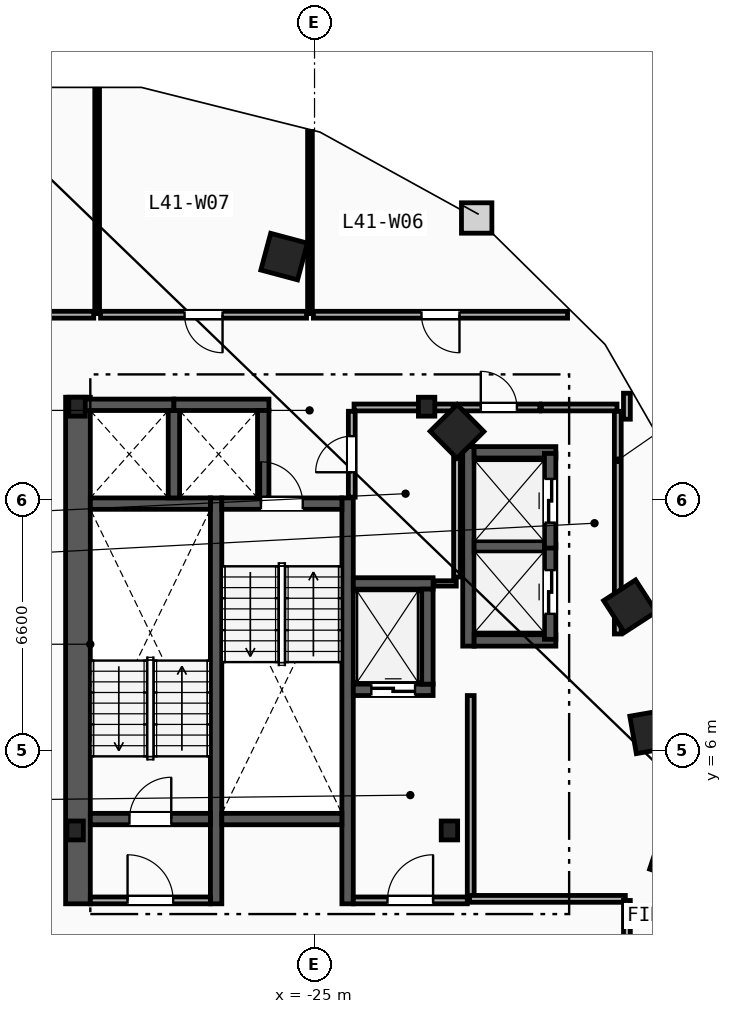
"""IFC4 building model, lengths in metres.
Left out: names, types, materials, properties, quantities, classifications, styles, units other than length and angle.
Written with IfcOpenShell. Run it as: python <this file> out.ifc"""

import sys

from ifc_helpers import new_model, si_unit, direction, frame, frame_2d, origin, origin_2d, place, context, subcontext, project, spatial, rectangle, i_section, extrude, element, fill, save


model = new_model("IFC4")
c1 = context("Model", 3, precision=1e-05, world=origin(), true_north=direction((0.0, 1.0)))
c2 = subcontext(c1, "Body", "Model", "MODEL_VIEW")
j1 = project(units=[si_unit("LENGTHUNIT", "METRE"), si_unit("PLANEANGLEUNIT", "RADIAN")], contexts=[c1])
p1 = place(None, origin())
s1 = spatial("IfcSite", under=j1, at=p1, CompositionType="ELEMENT")
p2 = place(p1, origin())
s2 = spatial("IfcBuilding", under=s1, at=p2, CompositionType="ELEMENT")
p3 = place(p2, frame((0.0, 0.0, 158.4)))
s3 = spatial("IfcBuildingStorey", under=s2, at=p3, CompositionType="ELEMENT", Elevation=158.4)
for number, where, z_axis, x_axis in (
    (1, (-31.3, 3.9, 0.0), (0.0, 0.0, 1.0), (1.0, 0.0, 0.0)),
    (2, (-21.45, 3.9, 0.0), (0.0, 0.0, 1.0), (1.0, 0.0, 0.0)),
    (3, (-22.05, 15.05, 0.0), (0.0, 0.0, 1.0), (1.0, 0.0, 0.0)),
    (4, (-31.25, 15.05, 0.0), (0.0, 0.0, 1.0), (1.0, 0.0, 0.0)),
):
    element("IfcColumn", number, at=place(p3, frame(where, z_axis=z_axis, x_axis=x_axis)), inside=s3, PredefinedType="COLUMN", context=c2, shape_type="SweptSolid", body=[
        extrude(i_section(OverallWidth=0.432, OverallDepth=0.498, WebThickness=0.056, FlangeThickness=0.089, FilletRadius=0.018, at=origin_2d()), origin(), (0.0, 0.0, 1.0), 3.6),
    ])
for number, where, z_axis, x_axis in (
    (5, (-15.55, 3.2, 0.0), (0.0, 0.0, 1.0), (0.315, 0.949, 0.0)),
    (6, (-16.125, 6.5, 0.0), (0.0, 0.0, 1.0), (-0.172, 0.985, 0.0)),
    (7, (-16.7, 9.8, 0.0), (0.0, 0.0, 1.0), (-0.544, 0.839, 0.0)),
    (8, (-21.25, 14.4, 0.0), (0.0, 0.0, 1.0), (-0.703, 0.711, 0.0)),
    (9, (-25.8, 19.0, 0.0), (0.0, 0.0, 1.0), (-0.966, 0.259, 0.0)),
):
    element("IfcColumn", number, at=place(p3, frame(where, z_axis=z_axis, x_axis=x_axis)), inside=s3, PredefinedType="COLUMN", context=c2, shape_type="SweptSolid", body=[
        extrude(rectangle(XDim=1.0, YDim=1.0, at=origin_2d()), origin(), (0.0, 0.0, 1.0), 3.6),
    ])
p4 = place(p3, frame((-31.225, 1.97, 0.0), z_axis=(0.0, 0.0, 1.0), x_axis=(0.0, 1.0, 0.0)))
e10 = element("IfcWall", 10, at=p4, inside=s3, PredefinedType="SHEAR", context=c2, shape_type="SweptSolid", body=[
    extrude(rectangle(XDim=13.33, YDim=0.65, at=frame_2d((6.665, 0.0))), origin(), (0.0, 0.0, 1.0), 3.36),
])
for number, where, z_axis, x_axis in (
    (11, (-27.59, 1.97, 0.0), (0.0, 0.0, 1.0), (0.0, 1.0, 0.0)),
    (12, (-24.13, 1.97, 0.0), (0.0, 0.0, 1.0), (0.0, 1.0, 0.0)),
):
    element("IfcWall", number, at=place(p3, frame(where, z_axis=z_axis, x_axis=x_axis)), inside=s3, PredefinedType="SHEAR", context=c2, shape_type="SweptSolid", body=[
        extrude(rectangle(XDim=10.68, YDim=0.3, at=frame_2d((5.34, 0.0))), origin(), (0.0, 0.0, 1.0), 3.36),
    ])
p5 = place(p3, frame((-30.9, 4.2, 0.0), z_axis=(0.0, 0.0, 1.0), x_axis=(1.0, 0.0, 0.0)))
e13 = element("IfcWall", 13, at=p5, inside=s3, PredefinedType="SHEAR", context=c2, shape_type="SweptSolid", body=[
    extrude(rectangle(XDim=3.16, YDim=0.3, at=frame_2d((1.58, 0.0))), origin(), (0.0, 0.0, 1.0), 3.36),
])
p6 = place(p5, frame((1.03, 0.0, 0.0)))
e14 = element("IfcOpeningElement", 14, at=p6, cuts=e13, PredefinedType="OPENING", context=c2, shape_type="SweptSolid", body=[
    extrude(rectangle(XDim=1.1, YDim=2.15, at=frame_2d((0.55, 1.075))), frame((0.0, 0.16, 0.0), z_axis=(0.0, -1.0, 0.0), x_axis=(1.0, 0.0, 0.0)), (0.0, 0.0, 1.0), 0.32),
])
p7 = place(p3, frame((-30.9, 12.5, 0.0), z_axis=(0.0, 0.0, 1.0), x_axis=(1.0, 0.0, 0.0)))
e15 = element("IfcWall", 15, at=p7, inside=s3, PredefinedType="SHEAR", context=c2, shape_type="SweptSolid", body=[
    extrude(rectangle(XDim=3.16, YDim=0.3, at=frame_2d((1.58, 0.0))), origin(), (0.0, 0.0, 1.0), 3.36),
])
p8 = place(p3, frame((-27.44, 12.5, 0.0), z_axis=(0.0, 0.0, 1.0), x_axis=(1.0, 0.0, 0.0)))
e16 = element("IfcWall", 16, at=p8, inside=s3, PredefinedType="SHEAR", context=c2, shape_type="SweptSolid", body=[
    extrude(rectangle(XDim=3.16, YDim=0.3, at=frame_2d((1.58, 0.0))), origin(), (0.0, 0.0, 1.0), 3.36),
])
p9 = place(p8, frame((1.03, 0.0, 0.0)))
e17 = element("IfcOpeningElement", 17, at=p9, cuts=e16, PredefinedType="OPENING", context=c2, shape_type="SweptSolid", body=[
    extrude(rectangle(XDim=1.1, YDim=2.15, at=frame_2d((0.55, 1.075))), frame((0.0, 0.16, 0.0), z_axis=(0.0, -1.0, 0.0), x_axis=(1.0, 0.0, 0.0)), (0.0, 0.0, 1.0), 0.32),
])
p10 = place(p3, frame((-27.44, 4.2, 0.0), z_axis=(0.0, 0.0, 1.0), x_axis=(1.0, 0.0, 0.0)))
e18 = element("IfcWall", 18, at=p10, inside=s3, PredefinedType="SHEAR", context=c2, shape_type="SweptSolid", body=[
    extrude(rectangle(XDim=3.16, YDim=0.3, at=frame_2d((1.58, 0.0))), origin(), (0.0, 0.0, 1.0), 3.36),
])
p11 = place(p3, frame((-20.89, 2.15, 0.0), z_axis=(0.0, 0.0, 1.0), x_axis=(0.0, 1.0, 0.0)))
e19 = element("IfcWall", 19, at=p11, inside=s3, PredefinedType="PARTITIONING", context=c2, shape_type="SweptSolid", body=[
    extrude(rectangle(XDim=5.3, YDim=0.18, at=frame_2d((2.65, 0.0))), origin(), (0.0, 0.0, 1.0), 3.36),
])
p12 = place(p3, frame((-23.98, 2.06, 0.0), z_axis=(0.0, 0.0, 1.0), x_axis=(1.0, 0.0, 0.0)))
e20 = element("IfcWall", 20, at=p12, inside=s3, PredefinedType="PARTITIONING", context=c2, shape_type="SweptSolid", body=[
    extrude(rectangle(XDim=3.0, YDim=0.18, at=frame_2d((1.5, 0.0))), origin(), (0.0, 0.0, 1.0), 3.36),
])
p13 = place(p12, frame((0.9, 0.0, 0.0)))
e21 = element("IfcOpeningElement", 21, at=p13, cuts=e20, PredefinedType="OPENING", context=c2, shape_type="SweptSolid", body=[
    extrude(rectangle(XDim=1.2, YDim=2.15, at=frame_2d((0.6, 1.075))), frame((0.0, 0.1, 0.0), z_axis=(0.0, -1.0, 0.0), x_axis=(1.0, 0.0, 0.0)), (0.0, 0.0, 1.0), 0.2),
])
p14 = place(p3, frame((-30.9, 2.06, 0.0), z_axis=(0.0, 0.0, 1.0), x_axis=(1.0, 0.0, 0.0)))
e22 = element("IfcWall", 22, at=p14, inside=s3, PredefinedType="PARTITIONING", context=c2, shape_type="SweptSolid", body=[
    extrude(rectangle(XDim=3.16, YDim=0.18, at=frame_2d((1.58, 0.0))), origin(), (0.0, 0.0, 1.0), 3.36),
])
p15 = place(p14, frame((0.98, 0.0, 0.0)))
e23 = element("IfcOpeningElement", 23, at=p15, cuts=e22, PredefinedType="OPENING", context=c2, shape_type="SweptSolid", body=[
    extrude(rectangle(XDim=1.2, YDim=2.15, at=frame_2d((0.6, 1.075))), frame((0.0, 0.1, 0.0), z_axis=(0.0, -1.0, 0.0), x_axis=(1.0, 0.0, 0.0)), (0.0, 0.0, 1.0), 0.2),
])
p16 = place(p3, frame((-23.98, 7.6, 0.0), z_axis=(0.0, 0.0, 1.0), x_axis=(1.0, 0.0, 0.0)))
e24 = element("IfcWall", 24, at=p16, inside=s3, PredefinedType="SHEAR", context=c2, shape_type="SweptSolid", body=[
    extrude(rectangle(XDim=2.1, YDim=0.3, at=frame_2d((1.05, 0.0))), origin(), (0.0, 0.0, 1.0), 3.36),
])
p17 = place(p16, frame((0.475, 0.0, 0.0)))
e25 = element("IfcOpeningElement", 25, at=p17, cuts=e24, PredefinedType="OPENING", context=c2, shape_type="SweptSolid", body=[
    extrude(rectangle(XDim=1.15, YDim=2.2, at=frame_2d((0.575, 1.1))), frame((0.0, 0.16, 0.0), z_axis=(0.0, -1.0, 0.0), x_axis=(1.0, 0.0, 0.0)), (0.0, 0.0, 1.0), 0.32),
])
p18 = place(p3, frame((-23.98, 10.4, 0.0), z_axis=(0.0, 0.0, 1.0), x_axis=(1.0, 0.0, 0.0)))
e26 = element("IfcWall", 26, at=p18, inside=s3, PredefinedType="SHEAR", context=c2, shape_type="SweptSolid", body=[
    extrude(rectangle(XDim=2.1, YDim=0.3, at=frame_2d((1.05, 0.0))), origin(), (0.0, 0.0, 1.0), 3.36),
])
for number, where, z_axis, x_axis in (
    (27, (-22.03, 7.75, 0.0), (0.0, 0.0, 1.0), (0.0, 1.0, 0.0)),
    (28, (-31.2, 15.1, 0.0), (0.0, 0.0, 1.0), (1.0, 0.0, 0.0)),
):
    element("IfcWall", number, at=place(p3, frame(where, z_axis=z_axis, x_axis=x_axis)), inside=s3, PredefinedType="SHEAR", context=c2, shape_type="SweptSolid", body=[
        extrude(rectangle(XDim=2.5, YDim=0.3, at=frame_2d((1.25, 0.0))), origin(), (0.0, 0.0, 1.0), 3.36),
    ])
p19 = place(p3, frame((-28.7, 12.65, 0.0), z_axis=(0.0, 0.0, 1.0), x_axis=(0.0, 1.0, 0.0)))
e29 = element("IfcWall", 29, at=p19, inside=s3, PredefinedType="SHEAR", context=c2, shape_type="SweptSolid", body=[
    extrude(rectangle(XDim=2.3, YDim=0.3, at=frame_2d((1.15, 0.0))), origin(), (0.0, 0.0, 1.0), 3.36),
])
p20 = place(p3, frame((-28.7, 15.1, 0.0), z_axis=(0.0, 0.0, 1.0), x_axis=(1.0, 0.0, 0.0)))
e30 = element("IfcWall", 30, at=p20, inside=s3, PredefinedType="SHEAR", context=c2, shape_type="SweptSolid", body=[
    extrude(rectangle(XDim=2.5, YDim=0.3, at=frame_2d((1.25, 0.0))), origin(), (0.0, 0.0, 1.0), 3.36),
])
p21 = place(p3, frame((-26.35, 12.65, 0.0), z_axis=(0.0, 0.0, 1.0), x_axis=(0.0, 1.0, 0.0)))
e31 = element("IfcWall", 31, at=p21, inside=s3, PredefinedType="SHEAR", context=c2, shape_type="SweptSolid", body=[
    extrude(rectangle(XDim=2.3, YDim=0.3, at=frame_2d((1.15, 0.0))), origin(), (0.0, 0.0, 1.0), 3.36),
])
p22 = place(p3, frame((-20.95, 8.75, 0.0), z_axis=(0.0, 0.0, 1.0), x_axis=(0.0, 1.0, 0.0)))
e32 = element("IfcWall", 32, at=p22, inside=s3, PredefinedType="SHEAR", context=c2, shape_type="SweptSolid", body=[
    extrude(rectangle(XDim=5.25, YDim=0.3, at=frame_2d((2.625, 0.0))), origin(), (0.0, 0.0, 1.0), 3.36),
])
for number, where, z_axis, x_axis in (
    (33, (-20.8, 8.9, 0.0), (0.0, 0.0, 1.0), (1.0, 0.0, 0.0)),
    (34, (-20.8, 13.85, 0.0), (0.0, 0.0, 1.0), (1.0, 0.0, 0.0)),
):
    element("IfcWall", number, at=place(p3, frame(where, z_axis=z_axis, x_axis=x_axis)), inside=s3, PredefinedType="SHEAR", context=c2, shape_type="SweptSolid", body=[
        extrude(rectangle(XDim=2.15, YDim=0.3, at=frame_2d((1.075, 0.0))), origin(), (0.0, 0.0, 1.0), 3.36),
    ])
p23 = place(p3, frame((-20.8, 11.375, 0.0), z_axis=(0.0, 0.0, 1.0), x_axis=(1.0, 0.0, 0.0)))
e35 = element("IfcWall", 35, at=p23, inside=s3, PredefinedType="SHEAR", context=c2, shape_type="SweptSolid", body=[
    extrude(rectangle(XDim=1.85, YDim=0.3, at=frame_2d((0.925, 0.0))), origin(), (0.0, 0.0, 1.0), 3.36),
])
p24 = place(p3, frame((-18.8, 8.93, 0.0), z_axis=(0.0, 0.0, 1.0), x_axis=(0.0, 1.0, 0.0)))
e36 = element("IfcWall", 36, at=p24, inside=s3, PredefinedType="SHEAR", context=c2, shape_type="SweptSolid", body=[
    extrude(rectangle(XDim=2.49, YDim=0.3, at=frame_2d((1.245, 0.0))), origin(), (0.0, 0.0, 1.0), 3.36),
])
p25 = place(p24, frame((0.67, 0.0, 0.0)))
e37 = element("IfcOpeningElement", 37, at=p25, cuts=e36, PredefinedType="OPENING", context=c2, shape_type="SweptSolid", body=[
    extrude(rectangle(XDim=1.15, YDim=2.2, at=frame_2d((0.575, 1.1))), frame((0.0, 0.16, 0.0), z_axis=(0.0, -1.0, 0.0), x_axis=(1.0, 0.0, 0.0)), (0.0, 0.0, 1.0), 0.32),
])
p26 = place(p3, frame((-18.8, 11.33, 0.0), z_axis=(0.0, 0.0, 1.0), x_axis=(0.0, 1.0, 0.0)))
e38 = element("IfcWall", 38, at=p26, inside=s3, PredefinedType="SHEAR", context=c2, shape_type="SweptSolid", body=[
    extrude(rectangle(XDim=2.49, YDim=0.3, at=frame_2d((1.245, 0.0))), origin(), (0.0, 0.0, 1.0), 3.36),
])
p27 = place(p26, frame((0.67, 0.0, 0.0)))
e39 = element("IfcOpeningElement", 39, at=p27, cuts=e38, PredefinedType="OPENING", context=c2, shape_type="SweptSolid", body=[
    extrude(rectangle(XDim=1.15, YDim=2.2, at=frame_2d((0.575, 1.1))), frame((0.0, 0.16, 0.0), z_axis=(0.0, -1.0, 0.0), x_axis=(1.0, 0.0, 0.0)), (0.0, 0.0, 1.0), 0.32),
])
p28 = place(p3, frame((-17.02, 9.07, 0.0), z_axis=(0.0, 0.0, 1.0), x_axis=(0.0, 1.0, 0.0)))
e40 = element("IfcWall", 40, at=p28, inside=s3, PredefinedType="PARTITIONING", context=c2, shape_type="SweptSolid", body=[
    extrude(rectangle(XDim=5.86, YDim=0.18, at=frame_2d((2.93, 0.0))), origin(), (0.0, 0.0, 1.0), 3.36),
])
p29 = place(p3, frame((-21.23, 15.03, 0.0), z_axis=(0.0, 0.0, 1.0), x_axis=(1.0, 0.0, 0.0)))
e41 = element("IfcWall", 41, at=p29, inside=s3, PredefinedType="PARTITIONING", context=c2, shape_type="SweptSolid", body=[
    extrude(rectangle(XDim=2.16, YDim=0.18, at=frame_2d((1.08, 0.0))), origin(), (0.0, 0.0, 1.0), 3.36),
])
p30 = place(p29, frame((0.605, 0.0, 0.0)))
e42 = element("IfcOpeningElement", 42, at=p30, cuts=e41, PredefinedType="OPENING", context=c2, shape_type="SweptSolid", body=[
    extrude(rectangle(XDim=0.95, YDim=2.1, at=frame_2d((0.475, 1.05))), frame((0.0, 0.1, 0.0), z_axis=(0.0, -1.0, 0.0), x_axis=(1.0, 0.0, 0.0)), (0.0, 0.0, 1.0), 0.2),
])
p31 = place(p3, frame((-19.03, 15.03, 0.0), z_axis=(0.0, 0.0, 1.0), x_axis=(1.0, 0.0, 0.0)))
e43 = element("IfcWall", 43, at=p31, inside=s3, PredefinedType="PARTITIONING", context=c2, shape_type="SweptSolid", body=[
    extrude(rectangle(XDim=1.99, YDim=0.18, at=frame_2d((0.995, 0.0))), origin(), (0.0, 0.0, 1.0), 3.36),
])
p32 = place(p3, frame((-21.86, 10.4, 0.0), z_axis=(0.0, 0.0, 1.0), x_axis=(1.0, 0.0, 0.0)))
e44 = element("IfcWall", 44, at=p32, inside=s3, PredefinedType="PARTITIONING", context=c2, shape_type="SweptSolid", body=[
    extrude(rectangle(XDim=0.59, YDim=0.14, at=frame_2d((0.295, 0.0))), origin(), (0.0, 0.0, 1.0), 3.36),
])
p33 = place(p3, frame((-21.25, 10.57, 0.0), z_axis=(0.0, 0.0, 1.0), x_axis=(0.0, 1.0, 0.0)))
e45 = element("IfcWall", 45, at=p33, inside=s3, PredefinedType="PARTITIONING", context=c2, shape_type="SweptSolid", body=[
    extrude(rectangle(XDim=4.36, YDim=0.18, at=frame_2d((2.18, 0.0))), origin(), (0.0, 0.0, 1.0), 3.36),
])
p34 = place(p3, frame((-23.96, 15.03, 0.0), z_axis=(0.0, 0.0, 1.0), x_axis=(1.0, 0.0, 0.0)))
e46 = element("IfcWall", 46, at=p34, inside=s3, PredefinedType="PARTITIONING", context=c2, shape_type="SweptSolid", body=[
    extrude(rectangle(XDim=2.61, YDim=0.18, at=frame_2d((1.305, 0.0))), origin(), (0.0, 0.0, 1.0), 2.433),
])
p35 = place(p3, frame((-24.02, 12.67, 0.0), z_axis=(0.0, 0.0, 1.0), x_axis=(0.0, 1.0, 0.0)))
e47 = element("IfcWall", 47, at=p35, inside=s3, PredefinedType="PARTITIONING", context=c2, shape_type="SweptSolid", body=[
    extrude(rectangle(XDim=2.26, YDim=0.18, at=frame_2d((1.13, 0.0))), origin(), (0.0, 0.0, 1.0), 3.36),
])
p36 = place(p35, frame((0.655, 0.0, 0.0)))
e48 = element("IfcOpeningElement", 48, at=p36, cuts=e47, PredefinedType="OPENING", context=c2, shape_type="SweptSolid", body=[
    extrude(rectangle(XDim=0.95, YDim=2.1, at=frame_2d((0.475, 1.05))), frame((0.0, 0.1, 0.0), z_axis=(0.0, -1.0, 0.0), x_axis=(1.0, 0.0, 0.0)), (0.0, 0.0, 1.0), 0.2),
])
p37 = place(p3, frame((-30.72, 17.5, 0.0), z_axis=(0.0, 0.0, 1.0), x_axis=(0.0, 1.0, 0.0)))
e49 = element("IfcWall", 49, at=p37, inside=s3, PredefinedType="PARTITIONING", context=c2, shape_type="SweptSolid", body=[
    extrude(rectangle(XDim=5.902, YDim=0.125, at=frame_2d((2.951, 0.0))), origin(), (0.0, 0.0, 1.0), 3.36),
])
p38 = place(p3, frame((-25.12, 17.5, 0.0), z_axis=(0.0, 0.0, 1.0), x_axis=(0.0, 1.0, 0.0)))
e50 = element("IfcWall", 50, at=p38, inside=s3, PredefinedType="PARTITIONING", context=c2, shape_type="SweptSolid", body=[
    extrude(rectangle(XDim=4.791, YDim=0.125, at=frame_2d((2.396, 0.0))), origin(), (0.0, 0.0, 1.0), 3.36),
])
p39 = place(p3, frame((-16.822, 2.1, 0.0), z_axis=(0.0, 0.0, 1.0), x_axis=(-1.0, 0.0, 0.0)))
e51 = element("IfcWall", 51, at=p39, inside=s3, PredefinedType="PARTITIONING", context=c2, shape_type="SweptSolid", body=[
    extrude(rectangle(XDim=4.098, YDim=0.18, at=frame_2d((2.049, 0.0))), origin(), (0.0, 0.0, 1.0), 3.36),
])
p40 = place(p3, frame((-16.78, -0.329, 0.0), z_axis=(0.0, 0.0, 1.0), x_axis=(0.0, 1.0, 0.0)))
e52 = element("IfcWall", 52, at=p40, inside=s3, PredefinedType="PARTITIONING", context=c2, shape_type="SweptSolid", body=[
    extrude(rectangle(XDim=2.387, YDim=0.18, at=frame_2d((1.194, 0.0))), origin(), (0.0, 0.0, 1.0), 3.36),
])
p41 = place(p3, frame((-16.78, 14.721, 0.0), z_axis=(0.0, 0.0, 1.0), x_axis=(0.0, 1.0, 0.0)))
e53 = element("IfcWall", 53, at=p41, inside=s3, PredefinedType="PARTITIONING", context=c2, shape_type="SweptSolid", body=[
    extrude(rectangle(XDim=0.684, YDim=0.18, at=frame_2d((0.342, 0.0))), origin(), (0.0, 0.0, 1.0), 3.36),
])
p42 = place(p3, frame((-30.81, 17.47, 0.0), z_axis=(0.0, 0.0, 1.0), x_axis=(-1.0, 0.0, 0.0)))
e54 = element("IfcWall", 54, at=p42, inside=s3, PredefinedType="PARTITIONING", context=c2, shape_type="SweptSolid", body=[
    extrude(rectangle(XDim=2.818, YDim=0.18, at=frame_2d((1.409, 0.0))), origin(), (0.0, 0.0, 1.0), 3.36),
])
p43 = place(p3, frame((-18.342, 17.47, 0.0), z_axis=(0.0, 0.0, 1.0), x_axis=(-1.0, 0.0, 0.0)))
e55 = element("IfcWall", 55, at=p43, inside=s3, PredefinedType="PARTITIONING", context=c2, shape_type="SweptSolid", body=[
    extrude(rectangle(XDim=6.688, YDim=0.18, at=frame_2d((3.344, 0.0))), origin(), (0.0, 0.0, 1.0), 3.36),
])
p44 = place(p43, frame((2.844, 0.0, 0.0)))
e56 = element("IfcOpeningElement", 56, at=p44, cuts=e55, PredefinedType="OPENING", context=c2, shape_type="SweptSolid", body=[
    extrude(rectangle(XDim=1.0, YDim=2.15, at=frame_2d((0.5, 1.075))), frame((0.0, 0.1, 0.0), z_axis=(0.0, -1.0, 0.0), x_axis=(1.0, 0.0, 0.0)), (0.0, 0.0, 1.0), 0.2),
])
p45 = place(p3, frame((-25.21, 17.47, 0.0), z_axis=(0.0, 0.0, 1.0), x_axis=(-1.0, 0.0, 0.0)))
e57 = element("IfcWall", 57, at=p45, inside=s3, PredefinedType="PARTITIONING", context=c2, shape_type="SweptSolid", body=[
    extrude(rectangle(XDim=5.42, YDim=0.18, at=frame_2d((2.71, 0.0))), origin(), (0.0, 0.0, 1.0), 3.36),
])
p46 = place(p45, frame((2.21, 0.0, 0.0)))
e58 = element("IfcOpeningElement", 58, at=p46, cuts=e57, PredefinedType="OPENING", context=c2, shape_type="SweptSolid", body=[
    extrude(rectangle(XDim=1.0, YDim=2.15, at=frame_2d((0.5, 1.075))), frame((0.0, 0.1, 0.0), z_axis=(0.0, -1.0, 0.0), x_axis=(1.0, 0.0, 0.0)), (0.0, 0.0, 1.0), 0.2),
])
p47 = place(p6, origin())
e59 = element("IfcDoor", 59, at=p47, inside=s3, OperationType="SINGLE_SWING_RIGHT", PredefinedType="DOOR", context=c2, shape_type="SweptSolid", body=[
    extrude(rectangle(XDim=1.1, YDim=2.15, at=frame_2d((0.55, 1.075))), frame((0.0, 0.025, 0.0), z_axis=(0.0, -1.0, 0.0), x_axis=(1.0, 0.0, 0.0)), (0.0, 0.0, 1.0), 0.05),
])
fill(e14, e59)
p48 = place(p9, origin())
e60 = element("IfcDoor", 60, at=p48, inside=s3, OperationType="SINGLE_SWING_LEFT", PredefinedType="DOOR", context=c2, shape_type="SweptSolid", body=[
    extrude(rectangle(XDim=1.1, YDim=2.15, at=frame_2d((0.55, 1.075))), frame((0.0, 0.025, 0.0), z_axis=(0.0, -1.0, 0.0), x_axis=(1.0, 0.0, 0.0)), (0.0, 0.0, 1.0), 0.05),
])
fill(e17, e60)
p49 = place(p13, origin())
e61 = element("IfcDoor", 61, at=p49, inside=s3, OperationType="SINGLE_SWING_RIGHT", PredefinedType="DOOR", context=c2, shape_type="SweptSolid", body=[
    extrude(rectangle(XDim=1.2, YDim=2.15, at=frame_2d((0.6, 1.075))), frame((0.0, 0.025, 0.0), z_axis=(0.0, -1.0, 0.0), x_axis=(1.0, 0.0, 0.0)), (0.0, 0.0, 1.0), 0.05),
])
fill(e21, e61)
p50 = place(p15, origin())
e62 = element("IfcDoor", 62, at=p50, inside=s3, OperationType="SINGLE_SWING_LEFT", PredefinedType="DOOR", context=c2, shape_type="SweptSolid", body=[
    extrude(rectangle(XDim=1.2, YDim=2.15, at=frame_2d((0.6, 1.075))), frame((0.0, 0.025, 0.0), z_axis=(0.0, -1.0, 0.0), x_axis=(1.0, 0.0, 0.0)), (0.0, 0.0, 1.0), 0.05),
])
fill(e23, e62)
p51 = place(p17, origin())
e63 = element("IfcDoor", 63, at=p51, inside=s3, OperationType="SLIDING_TO_LEFT", PredefinedType="TRAPDOOR", context=c2, shape_type="SweptSolid", body=[
    extrude(rectangle(XDim=1.15, YDim=2.2, at=frame_2d((0.575, 1.1))), frame((0.0, 0.025, 0.0), z_axis=(0.0, -1.0, 0.0), x_axis=(1.0, 0.0, 0.0)), (0.0, 0.0, 1.0), 0.05),
])
fill(e25, e63)
p52 = place(p25, origin())
e64 = element("IfcDoor", 64, at=p52, inside=s3, OperationType="SLIDING_TO_LEFT", PredefinedType="TRAPDOOR", context=c2, shape_type="SweptSolid", body=[
    extrude(rectangle(XDim=1.15, YDim=2.2, at=frame_2d((0.575, 1.1))), frame((0.0, 0.025, 0.0), z_axis=(0.0, -1.0, 0.0), x_axis=(1.0, 0.0, 0.0)), (0.0, 0.0, 1.0), 0.05),
])
fill(e37, e64)
p53 = place(p27, origin())
e65 = element("IfcDoor", 65, at=p53, inside=s3, OperationType="SLIDING_TO_LEFT", PredefinedType="TRAPDOOR", context=c2, shape_type="SweptSolid", body=[
    extrude(rectangle(XDim=1.15, YDim=2.2, at=frame_2d((0.575, 1.1))), frame((0.0, 0.025, 0.0), z_axis=(0.0, -1.0, 0.0), x_axis=(1.0, 0.0, 0.0)), (0.0, 0.0, 1.0), 0.05),
])
fill(e39, e65)
p54 = place(p44, origin())
e66 = element("IfcDoor", 66, at=p54, inside=s3, OperationType="SINGLE_SWING_LEFT", PredefinedType="DOOR", context=c2, shape_type="SweptSolid", body=[
    extrude(rectangle(XDim=1.0, YDim=2.15, at=frame_2d((0.5, 1.075))), frame((0.0, 0.025, 0.0), z_axis=(0.0, -1.0, 0.0), x_axis=(1.0, 0.0, 0.0)), (0.0, 0.0, 1.0), 0.05),
])
fill(e56, e66)
p55 = place(p46, origin())
e67 = element("IfcDoor", 67, at=p55, inside=s3, OperationType="SINGLE_SWING_LEFT", PredefinedType="DOOR", context=c2, shape_type="SweptSolid", body=[
    extrude(rectangle(XDim=1.0, YDim=2.15, at=frame_2d((0.5, 1.075))), frame((0.0, 0.025, 0.0), z_axis=(0.0, -1.0, 0.0), x_axis=(1.0, 0.0, 0.0)), (0.0, 0.0, 1.0), 0.05),
])
fill(e58, e67)
p56 = place(p36, origin())
e68 = element("IfcDoor", 68, at=p56, inside=s3, OperationType="SINGLE_SWING_LEFT", PredefinedType="DOOR", context=c2, shape_type="SweptSolid", body=[
    extrude(rectangle(XDim=0.95, YDim=2.1, at=frame_2d((0.475, 1.05))), frame((0.0, 0.025, 0.0), z_axis=(0.0, -1.0, 0.0), x_axis=(1.0, 0.0, 0.0)), (0.0, 0.0, 1.0), 0.05),
])
fill(e48, e68)
p57 = place(p30, origin())
e69 = element("IfcDoor", 69, at=p57, inside=s3, OperationType="SINGLE_SWING_LEFT", PredefinedType="DOOR", context=c2, shape_type="SweptSolid", body=[
    extrude(rectangle(XDim=0.95, YDim=2.1, at=frame_2d((0.475, 1.05))), frame((0.0, 0.025, 0.0), z_axis=(0.0, -1.0, 0.0), x_axis=(1.0, 0.0, 0.0)), (0.0, 0.0, 1.0), 0.05),
])
fill(e42, e69)
save(model, sys.argv[1])
